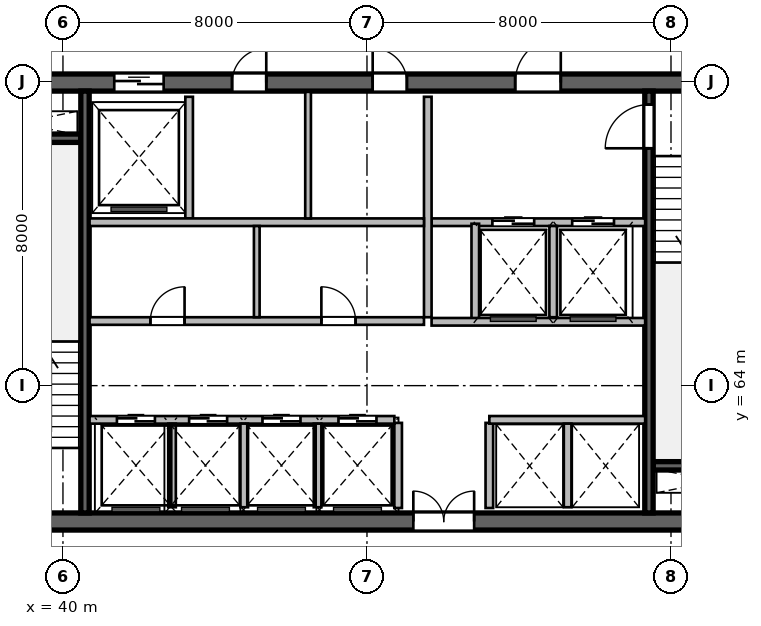
"""IFC4 building model, lengths in metres.
Left out: names, types, materials, properties, quantities, classifications, styles, units other than length and angle.
Written with IfcOpenShell. Run it as: python <this file> out.ifc"""

import sys

from ifc_helpers import new_model, si_unit, direction, frame, frame_2d, origin, place, context, subcontext, project, spatial, rectangle, extrude, source, transform, mapped, element, fill, save


model = new_model("IFC4")
c1 = context("Model", 3, precision=1e-05, world=origin(), true_north=direction((0.0, 1.0)))
c2 = subcontext(c1, "Body", "Model", "MODEL_VIEW")
j1 = project(units=[si_unit("LENGTHUNIT", "METRE"), si_unit("PLANEANGLEUNIT", "RADIAN")], contexts=[c1])
p1 = place(None, origin())
s1 = spatial("IfcSite", under=j1, at=p1, CompositionType="ELEMENT")
p2 = place(p1, origin())
s2 = spatial("IfcBuilding", under=s1, at=p2, CompositionType="ELEMENT")
p3 = place(p2, frame((0.0, 0.0, 231.3)))
s3 = spatial("IfcBuildingStorey", under=s2, at=p3, CompositionType="ELEMENT", Elevation=231.3)
m1 = source(origin(), c2, "Body", "SweptSolid", [
    extrude(rectangle(XDim=21.6, YDim=0.45, at=frame_2d((10.8, 0.0))), origin(), (0.0, 0.0, 1.0), 3.9),
])
p4 = place(p3, frame((37.2, 60.425, 0.0), z_axis=(0.0, 0.0, 1.0), x_axis=(1.0, 0.0, 0.0)))
e1 = element("IfcWall", 1, at=p4, inside=s3, PredefinedType="SHEAR", context=c2, shape_type="MappedRepresentation", body=[
    mapped(m1, transform((0.0, 0.0, 0.0), scale=1.0)),
])
p5 = place(p4, frame((1.1, 0.0, 0.0)))
e2 = element("IfcOpeningElement", 2, at=p5, cuts=e1, PredefinedType="OPENING", context=c2, shape_type="SweptSolid", body=[
    extrude(rectangle(XDim=1.15, YDim=2.15, at=frame_2d((0.575, 1.075))), frame((0.0, 0.235, 0.0), z_axis=(0.0, -1.0, 0.0), x_axis=(1.0, 0.0, 0.0)), (0.0, 0.0, 1.0), 0.47),
])
p6 = place(p4, frame((19.5, 0.0, 0.0)))
e3 = element("IfcOpeningElement", 3, at=p6, cuts=e1, PredefinedType="OPENING", context=c2, shape_type="SweptSolid", body=[
    extrude(rectangle(XDim=0.9, YDim=2.1, at=frame_2d((0.45, 1.05))), frame((0.0, 0.235, 0.0), z_axis=(0.0, -1.0, 0.0), x_axis=(1.0, 0.0, 0.0)), (0.0, 0.0, 1.0), 0.47),
])
p7 = place(p4, frame((12.02, 0.0, 0.0)))
e4 = element("IfcOpeningElement", 4, at=p7, cuts=e1, PredefinedType="OPENING", context=c2, shape_type="SweptSolid", body=[
    extrude(rectangle(XDim=1.6, YDim=2.15, at=frame_2d((0.8, 1.075))), frame((0.0, 0.235, 0.0), z_axis=(0.0, -1.0, 0.0), x_axis=(1.0, 0.0, 0.0)), (0.0, 0.0, 1.0), 0.47),
])
p8 = place(p3, frame((37.2, 71.975, 0.0), z_axis=(0.0, 0.0, 1.0), x_axis=(1.0, 0.0, 0.0)))
e5 = element("IfcWall", 5, at=p8, inside=s3, PredefinedType="SHEAR", context=c2, shape_type="MappedRepresentation", body=[
    mapped(m1, transform((0.0, 0.0, 0.0), scale=1.0)),
])
p9 = place(p8, frame((1.2, 0.0, 0.0)))
e6 = element("IfcOpeningElement", 6, at=p9, cuts=e5, PredefinedType="OPENING", context=c2, shape_type="SweptSolid", body=[
    extrude(rectangle(XDim=0.9, YDim=2.1, at=frame_2d((0.45, 1.05))), frame((0.0, 0.235, 0.0), z_axis=(0.0, -1.0, 0.0), x_axis=(1.0, 0.0, 0.0)), (0.0, 0.0, 1.0), 0.47),
])
p10 = place(p8, frame((14.7, 0.0, 0.0)))
e7 = element("IfcOpeningElement", 7, at=p10, cuts=e5, PredefinedType="OPENING", context=c2, shape_type="SweptSolid", body=[
    extrude(rectangle(XDim=1.2, YDim=2.15, at=frame_2d((0.6, 1.075))), frame((0.0, 0.235, 0.0), z_axis=(0.0, -1.0, 0.0), x_axis=(1.0, 0.0, 0.0)), (0.0, 0.0, 1.0), 0.47),
])
p11 = place(p8, frame((4.15, 0.0, 0.0)))
e8 = element("IfcOpeningElement", 8, at=p11, cuts=e5, PredefinedType="OPENING", context=c2, shape_type="SweptSolid", body=[
    extrude(rectangle(XDim=1.3, YDim=2.15, at=frame_2d((0.65, 1.075))), frame((0.0, 0.235, 0.0), z_axis=(0.0, -1.0, 0.0), x_axis=(1.0, 0.0, 0.0)), (0.0, 0.0, 1.0), 0.47),
])
p12 = place(p8, frame((7.25, 0.0, 0.0)))
e9 = element("IfcOpeningElement", 9, at=p12, cuts=e5, PredefinedType="OPENING", context=c2, shape_type="SweptSolid", body=[
    extrude(rectangle(XDim=0.9, YDim=2.1, at=frame_2d((0.45, 1.05))), frame((0.0, 0.235, 0.0), z_axis=(0.0, -1.0, 0.0), x_axis=(1.0, 0.0, 0.0)), (0.0, 0.0, 1.0), 0.47),
])
p13 = place(p8, frame((10.95, 0.0, 0.0)))
e10 = element("IfcOpeningElement", 10, at=p13, cuts=e5, PredefinedType="OPENING", context=c2, shape_type="SweptSolid", body=[
    extrude(rectangle(XDim=0.9, YDim=2.1, at=frame_2d((0.45, 1.05))), frame((0.0, 0.235, 0.0), z_axis=(0.0, -1.0, 0.0), x_axis=(1.0, 0.0, 0.0)), (0.0, 0.0, 1.0), 0.47),
])
m2 = source(origin(), c2, "Body", "SweptSolid", [
    extrude(rectangle(XDim=3.27, YDim=0.22, at=frame_2d((1.635, 0.0))), origin(), (0.0, 0.0, 1.0), 3.9),
])
for number, where, z_axis, x_axis in (
    (11, (37.2, 70.51, 0.0), (0.0, 0.0, 1.0), (1.0, 0.0, 0.0)),
    (12, (55.53, 61.89, 0.0), (0.0, 0.0, 1.0), (1.0, 0.0, 0.0)),
):
    element("IfcWall", number, at=place(p3, frame(where, z_axis=z_axis, x_axis=x_axis)), inside=s3, PredefinedType="SHEAR", context=c2, shape_type="MappedRepresentation", body=[
        mapped(m2, transform((0.0, 0.0, 0.0), scale=1.0)),
    ])
m3 = source(origin(), c2, "Body", "SweptSolid", [
    extrude(rectangle(XDim=11.1, YDim=0.22, at=frame_2d((5.55, 0.0))), origin(), (0.0, 0.0, 1.0), 3.9),
])
p14 = place(p3, frame((40.58, 60.65, 0.0), z_axis=(0.0, 0.0, 1.0), x_axis=(0.0, 1.0, 0.0)))
e13 = element("IfcWall", 13, at=p14, inside=s3, PredefinedType="SHEAR", context=c2, shape_type="MappedRepresentation", body=[
    mapped(m3, transform((0.0, 0.0, 0.0), scale=1.0)),
])
p15 = place(p3, frame((55.42, 60.65, 0.0), z_axis=(0.0, 0.0, 1.0), x_axis=(0.0, 1.0, 0.0)))
e14 = element("IfcWall", 14, at=p15, inside=s3, PredefinedType="SHEAR", context=c2, shape_type="MappedRepresentation", body=[
    mapped(m3, transform((0.0, 0.0, 0.0), scale=1.0)),
])
p16 = place(p15, frame((9.595, 0.0, 0.0)))
e15 = element("IfcOpeningElement", 15, at=p16, cuts=e14, PredefinedType="OPENING", context=c2, shape_type="SweptSolid", body=[
    extrude(rectangle(XDim=1.15, YDim=2.15, at=frame_2d((0.575, 1.075))), frame((0.0, 0.12, 0.0), z_axis=(0.0, -1.0, 0.0), x_axis=(1.0, 0.0, 0.0)), (0.0, 0.0, 1.0), 0.24),
])
m4 = source(origin(), c2, "Body", "SweptSolid", [
    extrude(rectangle(XDim=2.24, YDim=0.2, at=frame_2d((1.12, 0.0))), origin(), (0.0, 0.0, 1.0), 3.65),
])
for number, where, z_axis, x_axis in (
    (16, (48.82, 60.78, 0.0), (0.0, 0.0, 1.0), (0.0, 1.0, 0.0)),
    (17, (51.22, 60.78, 0.0), (0.0, 0.0, 1.0), (0.0, 1.0, 0.0)),
):
    element("IfcWall", number, at=place(p3, frame(where, z_axis=z_axis, x_axis=x_axis)), inside=s3, PredefinedType="SOLIDWALL", context=c2, shape_type="MappedRepresentation", body=[
        mapped(m4, transform((0.0, 0.0, 0.0), scale=1.0)),
    ])
m5 = source(origin(), c2, "Body", "SweptSolid", [
    extrude(rectangle(XDim=5.62, YDim=0.2, at=frame_2d((2.81, 0.0))), origin(), (0.0, 0.0, 1.0), 3.65),
])
p17 = place(p3, frame((49.7, 68.3, 0.0), z_axis=(0.0, 0.0, 1.0), x_axis=(1.0, 0.0, 0.0)))
e18 = element("IfcWall", 18, at=p17, inside=s3, PredefinedType="SOLIDWALL", context=c2, shape_type="MappedRepresentation", body=[
    mapped(m5, transform((0.0, 0.0, 0.0), scale=1.0)),
])
p18 = place(p17, frame((1.6, 0.0, 0.0)))
e19 = element("IfcOpeningElement", 19, at=p18, cuts=e18, PredefinedType="OPENING", context=c2, shape_type="SweptSolid", body=[
    extrude(rectangle(XDim=1.1, YDim=2.15, at=frame_2d((0.55, 1.075))), frame((0.0, 0.11, 0.0), z_axis=(0.0, -1.0, 0.0), x_axis=(1.0, 0.0, 0.0)), (0.0, 0.0, 1.0), 0.22),
])
p19 = place(p17, frame((3.7, 0.0, 0.0)))
e20 = element("IfcOpeningElement", 20, at=p19, cuts=e18, PredefinedType="OPENING", context=c2, shape_type="SweptSolid", body=[
    extrude(rectangle(XDim=1.1, YDim=2.15, at=frame_2d((0.55, 1.075))), frame((0.0, 0.11, 0.0), z_axis=(0.0, -1.0, 0.0), x_axis=(1.0, 0.0, 0.0)), (0.0, 0.0, 1.0), 0.22),
])
m6 = source(origin(), c2, "Body", "SweptSolid", [
    extrude(rectangle(XDim=5.8, YDim=0.2, at=frame_2d((2.9, 0.0))), origin(), (0.0, 0.0, 1.0), 3.65),
])
p20 = place(p3, frame((49.6, 65.8, 0.0), z_axis=(0.0, 0.0, 1.0), x_axis=(0.0, 1.0, 0.0)))
e21 = element("IfcWall", 21, at=p20, inside=s3, PredefinedType="SOLIDWALL", context=c2, shape_type="MappedRepresentation", body=[
    mapped(m6, transform((0.0, 0.0, 0.0), scale=1.0)),
])
m7 = source(origin(), c2, "Body", "SweptSolid", [
    extrude(rectangle(XDim=2.58, YDim=0.2, at=frame_2d((1.29, 0.0))), origin(), (0.0, 0.0, 1.0), 3.65),
])
p21 = place(p3, frame((50.85, 65.68, 0.0), z_axis=(0.0, 0.0, 1.0), x_axis=(0.0, 1.0, 0.0)))
e22 = element("IfcWall", 22, at=p21, inside=s3, PredefinedType="SOLIDWALL", context=c2, shape_type="MappedRepresentation", body=[
    mapped(m7, transform((0.0, 0.0, 0.0), scale=1.0)),
])
m8 = source(origin(), c2, "Body", "SweptSolid", [
    extrude(rectangle(XDim=2.4, YDim=0.2, at=frame_2d((1.2, 0.0))), origin(), (0.0, 0.0, 1.0), 3.65),
])
p22 = place(p3, frame((52.9, 65.8, 0.0), z_axis=(0.0, 0.0, 1.0), x_axis=(0.0, 1.0, 0.0)))
e23 = element("IfcWall", 23, at=p22, inside=s3, PredefinedType="SOLIDWALL", context=c2, shape_type="MappedRepresentation", body=[
    mapped(m8, transform((0.0, 0.0, 0.0), scale=1.0)),
])
p23 = place(p3, frame((49.7, 65.68, 0.0), z_axis=(0.0, 0.0, 1.0), x_axis=(1.0, 0.0, 0.0)))
e24 = element("IfcWall", 24, at=p23, inside=s3, PredefinedType="SOLIDWALL", context=c2, shape_type="MappedRepresentation", body=[
    mapped(m5, transform((0.0, 0.0, 0.0), scale=1.0)),
])
m9 = source(origin(), c2, "Body", "SweptSolid", [
    extrude(rectangle(XDim=3.2, YDim=0.2, at=frame_2d((1.6, 0.0))), origin(), (0.0, 0.0, 1.0), 3.65),
])
p24 = place(p3, frame((43.32, 68.4, 0.0), z_axis=(0.0, 0.0, 1.0), x_axis=(0.0, 1.0, 0.0)))
e25 = element("IfcWall", 25, at=p24, inside=s3, PredefinedType="SOLIDWALL", context=c2, shape_type="MappedRepresentation", body=[
    mapped(m9, transform((0.0, 0.0, 0.0), scale=1.0)),
])
m10 = source(origin(), c2, "Body", "SweptSolid", [
    extrude(rectangle(XDim=8.8, YDim=0.2, at=frame_2d((4.4, 0.0))), origin(), (0.0, 0.0, 1.0), 3.65),
])
p25 = place(p3, frame((40.7, 68.3, 0.0), z_axis=(0.0, 0.0, 1.0), x_axis=(1.0, 0.0, 0.0)))
e26 = element("IfcWall", 26, at=p25, inside=s3, PredefinedType="SOLIDWALL", context=c2, shape_type="MappedRepresentation", body=[
    mapped(m10, transform((0.0, 0.0, 0.0), scale=1.0)),
])
m11 = source(origin(), c2, "Body", "SweptSolid", [
    extrude(rectangle(XDim=3.33, YDim=0.15, at=frame_2d((1.665, 0.0))), origin(), (0.0, 0.0, 1.0), 3.65),
])
p26 = place(p3, frame((46.45, 68.4, 0.0), z_axis=(0.0, 0.0, 1.0), x_axis=(0.0, 1.0, 0.0)))
e27 = element("IfcWall", 27, at=p26, inside=s3, PredefinedType="PARTITIONING", context=c2, shape_type="MappedRepresentation", body=[
    mapped(m11, transform((0.0, 0.0, 0.0), scale=1.0)),
])
m12 = source(origin(), c2, "Body", "SweptSolid", [
    extrude(rectangle(XDim=8.02, YDim=0.2, at=frame_2d((4.01, 0.0))), origin(), (0.0, 0.0, 1.0), 3.65),
])
p27 = place(p3, frame((40.7, 63.1, 0.0), z_axis=(0.0, 0.0, 1.0), x_axis=(1.0, 0.0, 0.0)))
e28 = element("IfcWall", 28, at=p27, inside=s3, PredefinedType="SOLIDWALL", context=c2, shape_type="MappedRepresentation", body=[
    mapped(m12, transform((0.0, 0.0, 0.0), scale=1.0)),
])
p28 = place(p27, frame((0.72, 0.0, 0.0)))
e29 = element("IfcOpeningElement", 29, at=p28, cuts=e28, PredefinedType="OPENING", context=c2, shape_type="SweptSolid", body=[
    extrude(rectangle(XDim=1.0, YDim=2.15, at=frame_2d((0.5, 1.075))), frame((0.0, 0.11, 0.0), z_axis=(0.0, -1.0, 0.0), x_axis=(1.0, 0.0, 0.0)), (0.0, 0.0, 1.0), 0.22),
])
p29 = place(p27, frame((2.62, 0.0, 0.0)))
e30 = element("IfcOpeningElement", 30, at=p29, cuts=e28, PredefinedType="OPENING", context=c2, shape_type="SweptSolid", body=[
    extrude(rectangle(XDim=1.0, YDim=2.15, at=frame_2d((0.5, 1.075))), frame((0.0, 0.11, 0.0), z_axis=(0.0, -1.0, 0.0), x_axis=(1.0, 0.0, 0.0)), (0.0, 0.0, 1.0), 0.22),
])
p30 = place(p27, frame((4.55, 0.0, 0.0)))
e31 = element("IfcOpeningElement", 31, at=p30, cuts=e28, PredefinedType="OPENING", context=c2, shape_type="SweptSolid", body=[
    extrude(rectangle(XDim=1.0, YDim=2.15, at=frame_2d((0.5, 1.075))), frame((0.0, 0.11, 0.0), z_axis=(0.0, -1.0, 0.0), x_axis=(1.0, 0.0, 0.0)), (0.0, 0.0, 1.0), 0.22),
])
p31 = place(p27, frame((6.55, 0.0, 0.0)))
e32 = element("IfcOpeningElement", 32, at=p31, cuts=e28, PredefinedType="OPENING", context=c2, shape_type="SweptSolid", body=[
    extrude(rectangle(XDim=1.0, YDim=2.15, at=frame_2d((0.5, 1.075))), frame((0.0, 0.11, 0.0), z_axis=(0.0, -1.0, 0.0), x_axis=(1.0, 0.0, 0.0)), (0.0, 0.0, 1.0), 0.22),
])
m13 = source(origin(), c2, "Body", "SweptSolid", [
    extrude(rectangle(XDim=4.1, YDim=0.2, at=frame_2d((2.05, 0.0))), origin(), (0.0, 0.0, 1.0), 3.65),
])
p32 = place(p3, frame((51.22, 63.1, 0.0), z_axis=(0.0, 0.0, 1.0), x_axis=(1.0, 0.0, 0.0)))
e33 = element("IfcWall", 33, at=p32, inside=s3, PredefinedType="SOLIDWALL", context=c2, shape_type="MappedRepresentation", body=[
    mapped(m13, transform((0.0, 0.0, 0.0), scale=1.0)),
])
m14 = source(origin(), c2, "Body", "SweptSolid", [
    extrude(rectangle(XDim=2.2, YDim=0.2, at=frame_2d((1.1, 0.0))), origin(), (0.0, 0.0, 1.0), 3.65),
])
for number, where, z_axis, x_axis in (
    (34, (42.87, 60.8, 0.0), (0.0, 0.0, 1.0), (0.0, 1.0, 0.0)),
    (35, (44.77, 60.8, 0.0), (0.0, 0.0, 1.0), (0.0, 1.0, 0.0)),
    (36, (46.7, 60.8, 0.0), (0.0, 0.0, 1.0), (0.0, 1.0, 0.0)),
    (37, (53.28, 60.8, 0.0), (0.0, 0.0, 1.0), (0.0, 1.0, 0.0)),
):
    element("IfcWall", number, at=place(p3, frame(where, z_axis=z_axis, x_axis=x_axis)), inside=s3, PredefinedType="SOLIDWALL", context=c2, shape_type="MappedRepresentation", body=[
        mapped(m14, transform((0.0, 0.0, 0.0), scale=1.0)),
    ])
p33 = place(p3, frame((40.7, 65.7, 0.0), z_axis=(0.0, 0.0, 1.0), x_axis=(1.0, 0.0, 0.0)))
e38 = element("IfcWall", 38, at=p33, inside=s3, PredefinedType="SOLIDWALL", context=c2, shape_type="MappedRepresentation", body=[
    mapped(m10, transform((0.0, 0.0, 0.0), scale=1.0)),
])
p34 = place(p33, frame((1.6, 0.0, 0.0)))
e39 = element("IfcOpeningElement", 39, at=p34, cuts=e38, PredefinedType="OPENING", context=c2, shape_type="SweptSolid", body=[
    extrude(rectangle(XDim=0.9, YDim=2.1, at=frame_2d((0.45, 1.05))), frame((0.0, 0.11, 0.0), z_axis=(0.0, -1.0, 0.0), x_axis=(1.0, 0.0, 0.0)), (0.0, 0.0, 1.0), 0.22),
])
p35 = place(p33, frame((6.1, 0.0, 0.0)))
e40 = element("IfcOpeningElement", 40, at=p35, cuts=e38, PredefinedType="OPENING", context=c2, shape_type="SweptSolid", body=[
    extrude(rectangle(XDim=0.9, YDim=2.1, at=frame_2d((0.45, 1.05))), frame((0.0, 0.11, 0.0), z_axis=(0.0, -1.0, 0.0), x_axis=(1.0, 0.0, 0.0)), (0.0, 0.0, 1.0), 0.22),
])
m15 = source(origin(), c2, "Body", "SweptSolid", [
    extrude(rectangle(XDim=2.4, YDim=0.15, at=frame_2d((1.2, 0.0))), origin(), (0.0, 0.0, 1.0), 3.65),
])
p36 = place(p3, frame((45.1, 65.8, 0.0), z_axis=(0.0, 0.0, 1.0), x_axis=(0.0, 1.0, 0.0)))
e41 = element("IfcWall", 41, at=p36, inside=s3, PredefinedType="PARTITIONING", context=c2, shape_type="MappedRepresentation", body=[
    mapped(m15, transform((0.0, 0.0, 0.0), scale=1.0)),
])
m16 = source(origin(), c2, "Body", "SweptSolid", [
    extrude(rectangle(XDim=1.15, YDim=2.15, at=frame_2d((0.575, 1.075))), frame((0.0, 0.025, 0.0), z_axis=(0.0, -1.0, 0.0), x_axis=(1.0, 0.0, 0.0)), (0.0, 0.0, 1.0), 0.05),
])
p37 = place(p16, origin())
e42 = element("IfcDoor", 42, at=p37, inside=s3, OperationType="SINGLE_SWING_LEFT", PredefinedType="DOOR", context=c2, shape_type="MappedRepresentation", body=[
    mapped(m16, transform((0.0, 0.0, 0.0), scale=1.0)),
])
fill(e15, e42)
m17 = source(origin(), c2, "Body", "SweptSolid", [
    extrude(rectangle(XDim=1.6, YDim=2.15, at=frame_2d((0.8, 1.075))), frame((0.0, 0.025, 0.0), z_axis=(0.0, -1.0, 0.0), x_axis=(1.0, 0.0, 0.0)), (0.0, 0.0, 1.0), 0.05),
])
p38 = place(p7, origin())
e43 = element("IfcDoor", 43, at=p38, inside=s3, OperationType="DOUBLE_DOOR_SINGLE_SWING", PredefinedType="DOOR", context=c2, shape_type="MappedRepresentation", body=[
    mapped(m17, transform((0.0, 0.0, 0.0), scale=1.0)),
])
fill(e4, e43)
m18 = source(origin(), c2, "Body", "SweptSolid", [
    extrude(rectangle(XDim=1.2, YDim=2.15, at=frame_2d((0.6, 1.075))), frame((0.0, 0.025, 0.0), z_axis=(0.0, -1.0, 0.0), x_axis=(1.0, 0.0, 0.0)), (0.0, 0.0, 1.0), 0.05),
])
p39 = place(p10, origin())
e44 = element("IfcDoor", 44, at=p39, inside=s3, OperationType="SINGLE_SWING_RIGHT", PredefinedType="DOOR", context=c2, shape_type="MappedRepresentation", body=[
    mapped(m18, transform((0.0, 0.0, 0.0), scale=1.0)),
])
fill(e7, e44)
m19 = source(origin(), c2, "Body", "SweptSolid", [
    extrude(rectangle(XDim=1.1, YDim=2.15, at=frame_2d((0.55, 1.075))), frame((0.0, 0.025, 0.0), z_axis=(0.0, -1.0, 0.0), x_axis=(1.0, 0.0, 0.0)), (0.0, 0.0, 1.0), 0.05),
])
p40 = place(p18, origin())
e45 = element("IfcDoor", 45, at=p40, inside=s3, OperationType="DOUBLE_DOOR_SLIDING", PredefinedType="DOOR", context=c2, shape_type="MappedRepresentation", body=[
    mapped(m19, transform((0.0, 0.0, 0.0), scale=1.0)),
])
fill(e19, e45)
p41 = place(p19, origin())
e46 = element("IfcDoor", 46, at=p41, inside=s3, OperationType="DOUBLE_DOOR_SLIDING", PredefinedType="DOOR", context=c2, shape_type="MappedRepresentation", body=[
    mapped(m19, transform((0.0, 0.0, 0.0), scale=1.0)),
])
fill(e20, e46)
m20 = source(origin(), c2, "Body", "SweptSolid", [
    extrude(rectangle(XDim=1.3, YDim=2.15, at=frame_2d((0.65, 1.075))), frame((0.0, 0.025, 0.0), z_axis=(0.0, -1.0, 0.0), x_axis=(1.0, 0.0, 0.0)), (0.0, 0.0, 1.0), 0.05),
])
p42 = place(p11, origin())
e47 = element("IfcDoor", 47, at=p42, inside=s3, OperationType="DOUBLE_DOOR_SLIDING", PredefinedType="DOOR", context=c2, shape_type="MappedRepresentation", body=[
    mapped(m20, transform((0.0, 0.0, 0.0), scale=1.0)),
])
fill(e8, e47)
m21 = source(origin(), c2, "Body", "SweptSolid", [
    extrude(rectangle(XDim=0.9, YDim=2.1, at=frame_2d((0.45, 1.05))), frame((0.0, 0.025, 0.0), z_axis=(0.0, -1.0, 0.0), x_axis=(1.0, 0.0, 0.0)), (0.0, 0.0, 1.0), 0.05),
])
p43 = place(p12, origin())
e48 = element("IfcDoor", 48, at=p43, inside=s3, OperationType="SINGLE_SWING_RIGHT", PredefinedType="DOOR", context=c2, shape_type="MappedRepresentation", body=[
    mapped(m21, transform((0.0, 0.0, 0.0), scale=1.0)),
])
fill(e9, e48)
p44 = place(p13, origin())
e49 = element("IfcDoor", 49, at=p44, inside=s3, OperationType="SINGLE_SWING_LEFT", PredefinedType="DOOR", context=c2, shape_type="MappedRepresentation", body=[
    mapped(m21, transform((0.0, 0.0, 0.0), scale=1.0)),
])
fill(e10, e49)
m22 = source(origin(), c2, "Body", "SweptSolid", [
    extrude(rectangle(XDim=1.0, YDim=2.15, at=frame_2d((0.5, 1.075))), frame((0.0, 0.025, 0.0), z_axis=(0.0, -1.0, 0.0), x_axis=(1.0, 0.0, 0.0)), (0.0, 0.0, 1.0), 0.05),
])
p45 = place(p28, origin())
e50 = element("IfcDoor", 50, at=p45, inside=s3, OperationType="DOUBLE_DOOR_SLIDING", PredefinedType="DOOR", context=c2, shape_type="MappedRepresentation", body=[
    mapped(m22, transform((0.0, 0.0, 0.0), scale=1.0)),
])
fill(e29, e50)
p46 = place(p29, origin())
e51 = element("IfcDoor", 51, at=p46, inside=s3, OperationType="DOUBLE_DOOR_SLIDING", PredefinedType="DOOR", context=c2, shape_type="MappedRepresentation", body=[
    mapped(m22, transform((0.0, 0.0, 0.0), scale=1.0)),
])
fill(e30, e51)
p47 = place(p30, origin())
e52 = element("IfcDoor", 52, at=p47, inside=s3, OperationType="DOUBLE_DOOR_SLIDING", PredefinedType="DOOR", context=c2, shape_type="MappedRepresentation", body=[
    mapped(m22, transform((0.0, 0.0, 0.0), scale=1.0)),
])
fill(e31, e52)
p48 = place(p31, origin())
e53 = element("IfcDoor", 53, at=p48, inside=s3, OperationType="DOUBLE_DOOR_SLIDING", PredefinedType="DOOR", context=c2, shape_type="MappedRepresentation", body=[
    mapped(m22, transform((0.0, 0.0, 0.0), scale=1.0)),
])
fill(e32, e53)
p49 = place(p34, origin())
e54 = element("IfcDoor", 54, at=p49, inside=s3, OperationType="SINGLE_SWING_RIGHT", PredefinedType="DOOR", context=c2, shape_type="MappedRepresentation", body=[
    mapped(m21, transform((0.0, 0.0, 0.0), scale=1.0)),
])
fill(e39, e54)
p50 = place(p35, origin())
e55 = element("IfcDoor", 55, at=p50, inside=s3, OperationType="SINGLE_SWING_LEFT", PredefinedType="DOOR", context=c2, shape_type="MappedRepresentation", body=[
    mapped(m21, transform((0.0, 0.0, 0.0), scale=1.0)),
])
fill(e40, e55)
save(model, sys.argv[1])
